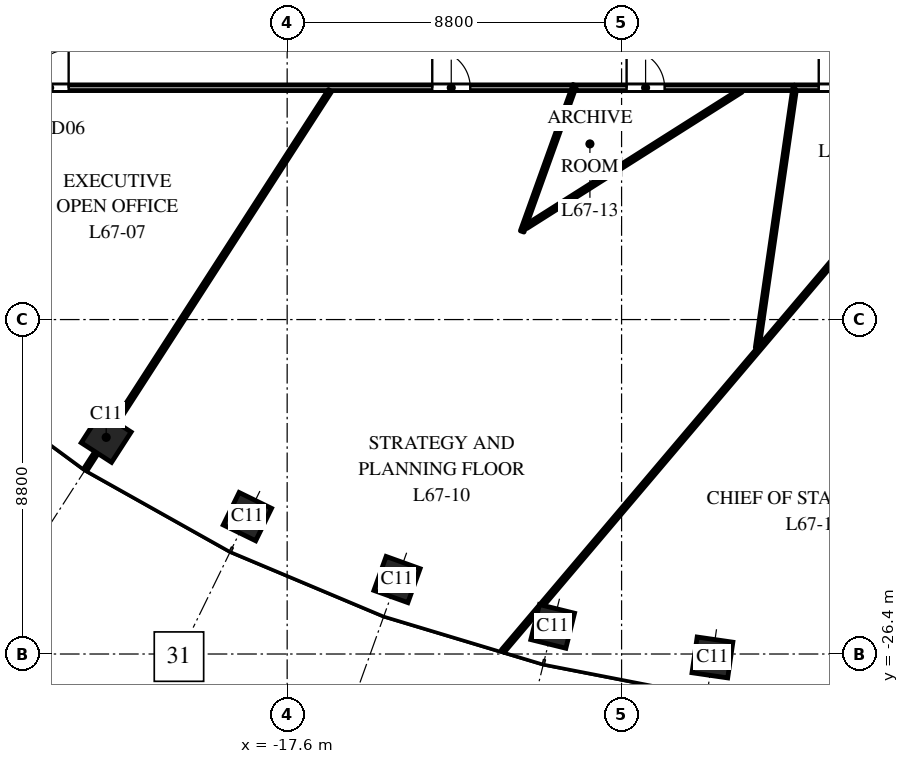
"""IFC4 building model, lengths in metres.
Left out: names, types, materials, properties, quantities, classifications, styles, units other than length and angle.
Written with IfcOpenShell. Run it as: python <this file> out.ifc"""

import sys

from ifc_helpers import new_model, si_unit, direction, frame, frame_2d, origin, origin_2d, place, context, subcontext, project, spatial, rectangle, extrude, element, fill, save


model = new_model("IFC4")
c1 = context("Model", 3, precision=1e-05, world=origin(), true_north=direction((0.0, 1.0)))
c2 = subcontext(c1, "Body", "Model", "MODEL_VIEW")
j1 = project(units=[si_unit("LENGTHUNIT", "METRE"), si_unit("PLANEANGLEUNIT", "RADIAN")], contexts=[c1])
p1 = place(None, origin())
s1 = spatial("IfcSite", under=j1, at=p1, CompositionType="ELEMENT")
p2 = place(p1, origin())
s2 = spatial("IfcBuilding", under=s1, at=p2, CompositionType="ELEMENT")
p3 = place(p2, frame((0.0, 0.0, 311.0)))
s3 = spatial("IfcBuildingStorey", under=s2, at=p3, CompositionType="ELEMENT", Elevation=311.0)
for number, where, z_axis, x_axis in (
    (1, (-22.362, -20.7, 0.0), (0.0, 0.0, 1.0), (0.84, -0.542, 0.0)),
    (2, (-18.646, -22.785, 0.0), (0.0, 0.0, 1.0), (0.898, -0.439, 0.0)),
    (3, (-14.709, -24.441, 0.0), (0.0, 0.0, 1.0), (0.941, -0.338, 0.0)),
    (4, (-10.613, -25.674, 0.0), (0.0, 0.0, 1.0), (0.971, -0.24, 0.0)),
    (5, (-6.409, -26.491, 0.0), (0.0, 0.0, 1.0), (0.99, -0.143, 0.0)),
):
    element("IfcColumn", number, at=place(p3, frame(where, z_axis=z_axis, x_axis=x_axis)), inside=s3, PredefinedType="COLUMN", context=c2, shape_type="SweptSolid", body=[
        extrude(rectangle(XDim=0.95, YDim=0.95, at=origin_2d()), origin(), (0.0, 0.0, 1.0), 4.0),
    ])
p4 = place(p3, frame((-31.5, -11.5, 0.0), z_axis=(0.0, 0.0, 1.0), x_axis=(1.0, 0.0, 0.0)))
e6 = element("IfcWall", 6, at=p4, inside=s3, PredefinedType="PARTITIONING", context=c2, shape_type="SweptSolid", body=[
    extrude(rectangle(XDim=21.432, YDim=0.15, at=frame_2d((10.716, 0.0))), origin(), (0.0, 0.0, 1.0), 2.75),
])
p5 = place(p4, frame((7.15, 0.0, 0.0)))
e7 = element("IfcOpeningElement", 7, at=p5, cuts=e6, PredefinedType="OPENING", context=c2, shape_type="SweptSolid", body=[
    extrude(rectangle(XDim=1.0, YDim=2.1, at=frame_2d((0.5, 1.05))), frame((0.0, 0.085, 0.0), z_axis=(0.0, -1.0, 0.0), x_axis=(1.0, 0.0, 0.0)), (0.0, 0.0, 1.0), 0.17),
])
p6 = place(p4, frame((17.718, 0.0, 0.0)))
e8 = element("IfcOpeningElement", 8, at=p6, cuts=e6, PredefinedType="OPENING", context=c2, shape_type="SweptSolid", body=[
    extrude(rectangle(XDim=1.0, YDim=2.1, at=frame_2d((0.5, 1.05))), frame((0.0, 0.085, 0.0), z_axis=(0.0, -1.0, 0.0), x_axis=(1.0, 0.0, 0.0)), (0.0, 0.0, 1.0), 0.17),
])
p7 = place(p3, frame((-22.905, -21.542, 0.0), z_axis=(0.0, 0.0, 1.0), x_axis=(0.54229092728, 0.840190782019, 0.0)))
e9 = element("IfcWall", 9, at=p7, inside=s3, PredefinedType="PARTITIONING", context=c2, shape_type="SweptSolid", body=[
    extrude(rectangle(XDim=11.863, YDim=0.1, at=frame_2d((5.931, 0.0))), origin(), (0.0, 0.0, 1.0), 2.75),
])
p8 = place(p3, frame((-11.925, -26.323, 0.0), z_axis=(0.0, 0.0, 1.0), x_axis=(0.646491267329, 0.762921386034, 0.0)))
e10 = element("IfcWall", 10, at=p8, inside=s3, PredefinedType="PARTITIONING", context=c2, shape_type="SweptSolid", body=[
    extrude(rectangle(XDim=16.859, YDim=0.1, at=frame_2d((8.429, 0.0))), origin(), (0.0, 0.0, 1.0), 2.85),
])
p9 = place(p3, frame((-11.416, -15.282, 0.0), z_axis=(0.0, 0.0, 1.0), x_axis=(0.33848088015, 0.940973269425, 0.0)))
e11 = element("IfcWall", 11, at=p9, inside=s3, PredefinedType="PARTITIONING", context=c2, shape_type="SweptSolid", body=[
    extrude(rectangle(XDim=4.095, YDim=0.1, at=frame_2d((2.047, 0.0))), origin(), (0.0, 0.0, 1.0), 2.75),
])
p10 = place(p3, frame((-11.319, -15.161, 0.0), z_axis=(0.0, 0.0, 1.0), x_axis=(0.844865171483, 0.534979291203, 0.0)))
e12 = element("IfcWall", 12, at=p10, inside=s3, PredefinedType="PARTITIONING", context=c2, shape_type="SweptSolid", body=[
    extrude(rectangle(XDim=6.703, YDim=0.1, at=frame_2d((3.352, 0.0))), origin(), (0.0, 0.0, 1.0), 3.7),
])
p11 = place(p3, frame((-10.003, -11.5, 0.0), z_axis=(0.0, 0.0, 1.0), x_axis=(1.0, 0.0, 0.0)))
e13 = element("IfcWall", 13, at=p11, inside=s3, PredefinedType="PARTITIONING", context=c2, shape_type="SweptSolid", body=[
    extrude(rectangle(XDim=5.741, YDim=0.15, at=frame_2d((2.871, 0.0))), origin(), (0.0, 0.0, 1.0), 2.75),
])
p12 = place(p11, frame((1.335, 0.0, 0.0)))
e14 = element("IfcOpeningElement", 14, at=p12, cuts=e13, PredefinedType="OPENING", context=c2, shape_type="SweptSolid", body=[
    extrude(rectangle(XDim=1.0, YDim=2.1, at=frame_2d((0.5, 1.05))), frame((0.0, 0.085, 0.0), z_axis=(0.0, -1.0, 0.0), x_axis=(1.0, 0.0, 0.0)), (0.0, 0.0, 1.0), 0.17),
])
p13 = place(p3, frame((-5.232, -18.347, 0.0), z_axis=(0.0, 0.0, 1.0), x_axis=(0.143100956717, 0.989708096454, 0.0)))
e15 = element("IfcWall", 15, at=p13, inside=s3, PredefinedType="PARTITIONING", context=c2, shape_type="SweptSolid", body=[
    extrude(rectangle(XDim=6.918, YDim=0.1, at=frame_2d((3.459, 0.0))), origin(), (0.0, 0.0, 1.0), 3.7),
])
p14 = place(p3, frame((-4.242, -11.5, 0.0), z_axis=(0.0, 0.0, 1.0), x_axis=(1.0, 0.0, 0.0)))
e16 = element("IfcWall", 16, at=p14, inside=s3, PredefinedType="PARTITIONING", context=c2, shape_type="SweptSolid", body=[
    extrude(rectangle(XDim=2.51, YDim=0.15, at=frame_2d((1.255, 0.0))), origin(), (0.0, 0.0, 1.0), 3.7),
])
p15 = place(p14, frame((0.63, 0.0, 0.0)))
e17 = element("IfcOpeningElement", 17, at=p15, cuts=e16, PredefinedType="OPENING", context=c2, shape_type="SweptSolid", body=[
    extrude(rectangle(XDim=1.0, YDim=2.1, at=frame_2d((0.5, 1.05))), frame((0.0, 0.085, 0.0), z_axis=(0.0, -1.0, 0.0), x_axis=(1.0, 0.0, 0.0)), (0.0, 0.0, 1.0), 0.17),
])
p16 = place(p5, origin())
e18 = element("IfcDoor", 18, at=p16, inside=s3, OperationType="SINGLE_SWING_RIGHT", PredefinedType="DOOR", context=c2, shape_type="SweptSolid", body=[
    extrude(rectangle(XDim=1.0, YDim=2.1, at=frame_2d((0.5, 1.05))), frame((0.0, 0.025, 0.0), z_axis=(0.0, -1.0, 0.0), x_axis=(1.0, 0.0, 0.0)), (0.0, 0.0, 1.0), 0.05),
])
fill(e7, e18)
p17 = place(p6, origin())
e19 = element("IfcDoor", 19, at=p17, inside=s3, OperationType="SINGLE_SWING_LEFT", PredefinedType="DOOR", context=c2, shape_type="SweptSolid", body=[
    extrude(rectangle(XDim=1.0, YDim=2.1, at=frame_2d((0.5, 1.05))), frame((0.0, 0.025, 0.0), z_axis=(0.0, -1.0, 0.0), x_axis=(1.0, 0.0, 0.0)), (0.0, 0.0, 1.0), 0.05),
])
fill(e8, e19)
p18 = place(p12, origin())
e20 = element("IfcDoor", 20, at=p18, inside=s3, OperationType="SINGLE_SWING_LEFT", PredefinedType="DOOR", context=c2, shape_type="SweptSolid", body=[
    extrude(rectangle(XDim=1.0, YDim=2.1, at=frame_2d((0.5, 1.05))), frame((0.0, 0.025, 0.0), z_axis=(0.0, -1.0, 0.0), x_axis=(1.0, 0.0, 0.0)), (0.0, 0.0, 1.0), 0.05),
])
fill(e14, e20)
p19 = place(p15, origin())
e21 = element("IfcDoor", 21, at=p19, inside=s3, OperationType="SINGLE_SWING_LEFT", PredefinedType="DOOR", context=c2, shape_type="SweptSolid", body=[
    extrude(rectangle(XDim=1.0, YDim=2.1, at=frame_2d((0.5, 1.05))), frame((0.0, 0.025, 0.0), z_axis=(0.0, -1.0, 0.0), x_axis=(1.0, 0.0, 0.0)), (0.0, 0.0, 1.0), 0.05),
])
fill(e17, e21)
save(model, sys.argv[1])
